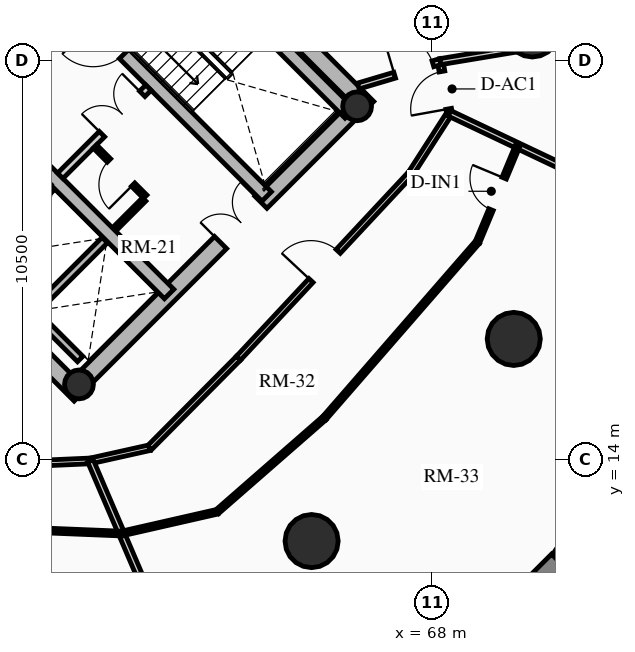
"""IFC4 building model, lengths in metres.
Left out: names, types, materials, properties, quantities, classifications, styles, units other than length and angle.
Written with IfcOpenShell. Run it as: python <this file> out.ifc"""

import sys

from ifc_helpers import new_model, si_unit, direction, frame, frame_2d, origin, origin_2d, place, context, subcontext, project, spatial, rectangle, circle, hollow_circle, extrude, source, transform, mapped, element, fill, save


model = new_model("IFC4")
c1 = context("Model", 3, precision=1e-05, world=origin(), true_north=direction((0.0, 1.0)))
c2 = subcontext(c1, "Body", "Model", "MODEL_VIEW")
j1 = project(units=[si_unit("LENGTHUNIT", "METRE"), si_unit("PLANEANGLEUNIT", "RADIAN")], contexts=[c1])
p1 = place(None, origin())
s1 = spatial("IfcSite", under=j1, at=p1, CompositionType="ELEMENT")
p2 = place(p1, origin())
s2 = spatial("IfcBuilding", under=s1, at=p2, CompositionType="ELEMENT")
p3 = place(p2, frame((0.0, 0.0, 110.89)))
s3 = spatial("IfcBuildingStorey", under=s2, at=p3, CompositionType="ELEMENT", Elevation=110.89)
for number, where, z_axis, x_axis in (
    (1, (58.737, 15.697, 0.0), (0.0, 0.0, 1.0), (-0.707, 0.707, 0.0)),
    (2, (66.303, 23.263, 0.0), (0.0, 0.0, 1.0), (-0.707, 0.707, 0.0)),
):
    element("IfcWall", number, at=place(p3, frame(where, z_axis=z_axis, x_axis=x_axis)), inside=s3, PredefinedType="SHEAR", context=c2, shape_type="SweptSolid", body=[
        extrude(rectangle(XDim=14.2, YDim=0.45, at=frame_2d((7.1, 0.0))), origin(), (0.0, 0.0, 1.0), 2.91),
    ])
p4 = place(p3, frame((58.578, 15.856, 0.0), z_axis=(0.0, 0.0, 1.0), x_axis=(0.707106781187, 0.707106781187, 0.0)))
e3 = element("IfcWall", 3, at=p4, inside=s3, PredefinedType="SHEAR", context=c2, shape_type="SweptSolid", body=[
    extrude(rectangle(XDim=10.7, YDim=0.45, at=frame_2d((5.35, 0.0))), origin(), (0.0, 0.0, 1.0), 2.91),
])
m1 = source(origin(), c2, "Body", "SweptSolid", [
    extrude(rectangle(XDim=1.5, YDim=2.02, at=frame_2d((0.75, 1.01))), frame((0.0, 0.235, 0.0), z_axis=(0.0, -1.0, 0.0), x_axis=(1.0, 0.0, 0.0)), (0.0, 0.0, 1.0), 0.47),
])
p5 = place(p4, frame((5.45, 0.0, 0.0)))
e4 = element("IfcOpeningElement", 4, at=p5, cuts=e3, PredefinedType="OPENING", context=c2, shape_type="MappedRepresentation", body=[
    mapped(m1, transform((0.0, 0.0, 0.0), x_axis=(1.0, 0.0, 0.0), y_axis=(0.0, 1.0, 0.0), z_axis=(0.0, 0.0, 1.0), scale=1.0)),
])
p6 = place(p3, frame((61.078, 18.355, 0.0), z_axis=(0.0, 0.0, 1.0), x_axis=(-0.707106781187, 0.707106781187, 0.0)))
e5 = element("IfcWall", 5, at=p6, inside=s3, PredefinedType="SHEAR", context=c2, shape_type="SweptSolid", body=[
    extrude(rectangle(XDim=13.75, YDim=0.35, at=frame_2d((6.875, 0.0))), origin(), (0.0, 0.0, 1.0), 2.91),
])
m2 = source(origin(), c2, "Body", "SweptSolid", [
    extrude(rectangle(XDim=1.1, YDim=2.015, at=frame_2d((0.55, 1.007))), frame((0.0, 0.185, 0.0), z_axis=(0.0, -1.0, 0.0), x_axis=(1.0, 0.0, 0.0)), (0.0, 0.0, 1.0), 0.37),
])
p7 = place(p6, frame((4.875, 0.0, 0.0)))
e6 = element("IfcOpeningElement", 6, at=p7, cuts=e5, PredefinedType="OPENING", context=c2, shape_type="MappedRepresentation", body=[
    mapped(m2, transform((0.0, 0.0, 0.0), x_axis=(1.0, 0.0, 0.0), y_axis=(0.0, 1.0, 0.0), z_axis=(0.0, 0.0, 1.0), scale=1.0)),
])
m3 = source(origin(), c2, "Body", "SweptSolid", [
    extrude(rectangle(XDim=1.15, YDim=2.02, at=frame_2d((0.575, 1.01))), frame((0.0, 0.185, 0.0), z_axis=(0.0, -1.0, 0.0), x_axis=(1.0, 0.0, 0.0)), (0.0, 0.0, 1.0), 0.37),
])
p8 = place(p6, frame((7.295, 0.0, 0.0)))
e7 = element("IfcOpeningElement", 7, at=p8, cuts=e5, PredefinedType="OPENING", context=c2, shape_type="MappedRepresentation", body=[
    mapped(m3, transform((0.0, 0.0, 0.0), x_axis=(1.0, 0.0, 0.0), y_axis=(0.0, 1.0, 0.0), z_axis=(0.0, 0.0, 1.0), scale=1.0)),
])
p9 = place(p3, frame((63.645, 20.922, 0.0), z_axis=(0.0, 0.0, 1.0), x_axis=(-0.707106781187, 0.707106781187, 0.0)))
e8 = element("IfcWall", 8, at=p9, inside=s3, PredefinedType="SHEAR", context=c2, shape_type="SweptSolid", body=[
    extrude(rectangle(XDim=13.75, YDim=0.35, at=frame_2d((6.875, 0.0))), origin(), (0.0, 0.0, 1.0), 2.91),
])
p10 = place(p9, frame((10.0, 0.0, 0.0)))
e9 = element("IfcOpeningElement", 9, at=p10, cuts=e8, PredefinedType="OPENING", context=c2, shape_type="MappedRepresentation", body=[
    mapped(m2, transform((0.0, 0.0, 0.0), x_axis=(1.0, 0.0, 0.0), y_axis=(0.0, 1.0, 0.0), z_axis=(0.0, 0.0, 1.0), scale=1.0)),
])
p11 = place(p9, frame((12.0, 0.0, 0.0)))
e10 = element("IfcOpeningElement", 10, at=p11, cuts=e8, PredefinedType="OPENING", context=c2, shape_type="MappedRepresentation", body=[
    mapped(m2, transform((0.0, 0.0, 0.0), x_axis=(1.0, 0.0, 0.0), y_axis=(0.0, 1.0, 0.0), z_axis=(0.0, 0.0, 1.0), scale=1.0)),
])
p12 = place(p9, frame((5.305, 0.0, 0.0)))
e11 = element("IfcOpeningElement", 11, at=p12, cuts=e8, PredefinedType="OPENING", context=c2, shape_type="MappedRepresentation", body=[
    mapped(m3, transform((0.0, 0.0, 0.0), x_axis=(1.0, 0.0, 0.0), y_axis=(0.0, 1.0, 0.0), z_axis=(0.0, 0.0, 1.0), scale=1.0)),
])
p13 = place(p3, frame((65.83, 23.107, 0.0), z_axis=(0.0, 0.0, 1.0), x_axis=(-0.707088616009, 0.707124945897, 0.0)))
e12 = element("IfcWall", 12, at=p13, inside=s3, PredefinedType="SHEAR", context=c2, shape_type="SweptSolid", body=[
    extrude(rectangle(XDim=6.72, YDim=0.35, at=frame_2d((3.36, 0.0))), origin(), (0.0, 0.0, 1.0), 2.91),
])
for number, where, z_axis, x_axis in (
    (13, (58.706, 15.976, 0.0), (0.0, 0.0, 1.0), (0.707, 0.707, 0.0)),
    (14, (66.024, 23.294, 0.0), (0.0, 0.0, 1.0), (0.707, 0.707, 0.0)),
):
    element("IfcColumn", number, at=place(p3, frame(where, z_axis=z_axis, x_axis=x_axis)), inside=s3, PredefinedType="COLUMN", context=c2, shape_type="SweptSolid", body=[
        extrude(hollow_circle(Radius=0.38, WallThickness=0.032, at=origin_2d()), origin(), (0.0, 0.0, 1.0), 2.91),
    ])
for number, where, z_axis, x_axis in (
    (15, (64.827, 11.854, 0.0), (0.0, 0.0, 1.0), (1.0, 0.0, 0.0)),
    (16, (70.146, 17.173, 0.0), (0.0, 0.0, 1.0), (1.0, 0.0, 0.0)),
    (17, (70.635, 25.291, 0.0), (0.0, 0.0, 1.0), (1.0, 0.0, 0.0)),
):
    element("IfcColumn", number, at=place(p3, frame(where, z_axis=z_axis, x_axis=x_axis)), inside=s3, PredefinedType="USERDEFINED", context=c2, shape_type="SweptSolid", body=[
        extrude(circle(Radius=0.7, at=origin_2d()), origin(), (0.0, 0.0, 1.0), 2.91),
    ])
p14 = place(p3, frame((70.985, 11.015, 0.0), z_axis=(0.0, 0.0, 1.0), x_axis=(-0.828781148131, -0.559572880421, 0.0)))
e18 = element("IfcWall", 18, at=p14, inside=s3, PredefinedType="SOLIDWALL", context=c2, shape_type="SweptSolid", body=[
    extrude(rectangle(XDim=4.905, YDim=0.24, at=frame_2d((2.452, 0.0))), origin(), (0.0, 0.0, 1.0), 2.179),
])
p15 = place(p3, frame((73.729, 15.08, 0.0), z_axis=(0.0, 0.0, 1.0), x_axis=(-0.559572880421, -0.828781148131, 0.0)))
e19 = element("IfcWall", 19, at=p15, inside=s3, PredefinedType="SOLIDWALL", context=c2, shape_type="SweptSolid", body=[
    extrude(rectangle(XDim=4.905, YDim=0.24, at=frame_2d((2.452, 0.0))), origin(), (0.0, 0.0, 1.0), 2.179),
])
m4 = source(origin(), c2, "Body", "SweptSolid", [
    extrude(rectangle(XDim=1.9, YDim=1.35, at=frame_2d((0.95, 0.675))), frame((0.0, 0.13, 0.0), z_axis=(0.0, -1.0, 0.0), x_axis=(1.0, 0.0, 0.0)), (0.0, 0.0, 1.0), 0.26),
])
p16 = place(p15, frame((1.502, 0.0, 0.65)))
e20 = element("IfcOpeningElement", 20, at=p16, cuts=e19, PredefinedType="OPENING", context=c2, shape_type="MappedRepresentation", body=[
    mapped(m4, transform((0.0, 0.0, 0.0), x_axis=(1.0, 0.0, 0.0), y_axis=(0.0, 1.0, 0.0), z_axis=(0.0, 0.0, 1.0), scale=1.0)),
])
p17 = place(p3, frame((55.888, 19.069, 0.0), z_axis=(0.0, 0.0, 1.0), x_axis=(0.707106781187, 0.707106781187, 0.0)))
e21 = element("IfcWall", 21, at=p17, inside=s3, PredefinedType="SHEAR", context=c2, shape_type="SweptSolid", body=[
    extrude(rectangle(XDim=2.97, YDim=0.2, at=frame_2d((1.485, 0.0))), origin(), (0.0, 0.0, 1.0), 2.91),
])
p18 = place(p3, frame((57.284, 17.673, 0.0), z_axis=(0.0, 0.0, 1.0), x_axis=(0.707147878904, 0.70706568108, 0.0)))
e22 = element("IfcWall", 22, at=p18, inside=s3, PredefinedType="SHEAR", context=c2, shape_type="SweptSolid", body=[
    extrude(rectangle(XDim=2.97, YDim=0.2, at=frame_2d((1.485, 0.0))), origin(), (0.0, 0.0, 1.0), 2.91),
])
p19 = place(p3, frame((58.737, 16.644, 0.0), z_axis=(0.0, 0.0, 1.0), x_axis=(-0.707032117043, 0.707181437447, 0.0)))
e23 = element("IfcWall", 23, at=p19, inside=s3, PredefinedType="SHEAR", context=c2, shape_type="SweptSolid", body=[
    extrude(rectangle(XDim=1.635, YDim=0.2, at=frame_2d((0.817, 0.0))), origin(), (0.0, 0.0, 1.0), 2.91),
])
p20 = place(p3, frame((58.214, 21.467, 0.0), z_axis=(0.0, 0.0, 1.0), x_axis=(0.707106781187, 0.707106781187, 0.0)))
e24 = element("IfcWall", 24, at=p20, inside=s3, PredefinedType="PARTITIONING", context=c2, shape_type="SweptSolid", body=[
    extrude(rectangle(XDim=3.28, YDim=0.2, at=frame_2d((1.64, 0.0))), origin(), (0.0, 0.0, 1.0), 2.655),
])
m5 = source(origin(), c2, "Body", "SweptSolid", [
    extrude(rectangle(XDim=1.5, YDim=2.02, at=frame_2d((0.75, 1.01))), frame((0.0, 0.11, 0.0), z_axis=(0.0, -1.0, 0.0), x_axis=(1.0, 0.0, 0.0)), (0.0, 0.0, 1.0), 0.22),
])
p21 = place(p20, frame((1.55, 0.0, 0.0)))
e25 = element("IfcOpeningElement", 25, at=p21, cuts=e24, PredefinedType="OPENING", context=c2, shape_type="MappedRepresentation", body=[
    mapped(m5, transform((0.0, 0.0, 0.0), x_axis=(1.0, 0.0, 0.0), y_axis=(0.0, 1.0, 0.0), z_axis=(0.0, 0.0, 1.0), scale=1.0)),
])
p22 = place(p3, frame((60.448, 20.915, 0.0), z_axis=(0.0, 0.0, 1.0), x_axis=(-0.707106781187, 0.707106781187, 0.0)))
e26 = element("IfcWall", 26, at=p22, inside=s3, PredefinedType="PARTITIONING", context=c2, shape_type="SweptSolid", body=[
    extrude(rectangle(XDim=1.87, YDim=0.125, at=frame_2d((0.935, 0.0))), origin(), (0.0, 0.0, 1.0), 2.655),
])
m6 = source(origin(), c2, "Body", "SweptSolid", [
    extrude(rectangle(XDim=0.9, YDim=2.005, at=frame_2d((0.45, 1.002))), frame((0.0, 0.073, 0.0), z_axis=(0.0, -1.0, 0.0), x_axis=(1.0, 0.0, 0.0)), (0.0, 0.0, 1.0), 0.145),
])
p23 = place(p22, frame((0.45, 0.0, 0.0)))
e27 = element("IfcOpeningElement", 27, at=p23, cuts=e26, PredefinedType="OPENING", context=c2, shape_type="MappedRepresentation", body=[
    mapped(m6, transform((0.0, 0.0, 0.0), x_axis=(1.0, 0.0, 0.0), y_axis=(0.0, 1.0, 0.0), z_axis=(0.0, 0.0, 1.0), scale=1.0)),
])
p24 = place(p3, frame((59.643, 20.066, 0.0), z_axis=(0.0, 0.0, 1.0), x_axis=(0.707106781187, 0.707106781187, 0.0)))
e28 = element("IfcWall", 28, at=p24, inside=s3, PredefinedType="PARTITIONING", context=c2, shape_type="SweptSolid", body=[
    extrude(rectangle(XDim=1.1, YDim=0.125, at=frame_2d((0.55, 0.0))), origin(), (0.0, 0.0, 1.0), 2.655),
])
p25 = place(p3, frame((57.511, 13.897, 0.0), z_axis=(0.0, 0.0, 1.0), x_axis=(0.999024538494, 0.044158481476, 0.0)))
e29 = element("IfcWall", 29, at=p25, inside=s3, PredefinedType="PARTITIONING", context=c2, shape_type="SweptSolid", body=[
    extrude(rectangle(XDim=1.498, YDim=0.15, at=frame_2d((0.749, 0.0))), origin(), (0.0, 0.0, 1.0), 2.225),
])
p26 = place(p3, frame((59.008, 13.963, 0.0), z_axis=(0.0, 0.0, 1.0), x_axis=(0.976020856791, 0.21767702476, 0.0)))
e30 = element("IfcWall", 30, at=p26, inside=s3, PredefinedType="PARTITIONING", context=c2, shape_type="SweptSolid", body=[
    extrude(rectangle(XDim=1.593, YDim=0.15, at=frame_2d((0.796, 0.0))), origin(), (0.0, 0.0, 1.0), 2.225),
])
p27 = place(p3, frame((60.562, 14.31, 0.0), z_axis=(0.0, 0.0, 1.0), x_axis=(0.704566236161, 0.709638230975, 0.0)))
e31 = element("IfcWall", 31, at=p27, inside=s3, PredefinedType="PARTITIONING", context=c2, shape_type="SweptSolid", body=[
    extrude(rectangle(XDim=3.321, YDim=0.15, at=frame_2d((1.661, 0.0))), origin(), (0.0, 0.0, 1.0), 2.225),
])
p28 = place(p3, frame((62.903, 16.667, 0.0), z_axis=(0.0, 0.0, 1.0), x_axis=(0.682371947497, 0.731005147225, 0.0)))
e32 = element("IfcWall", 32, at=p28, inside=s3, PredefinedType="PARTITIONING", context=c2, shape_type="SweptSolid", body=[
    extrude(rectangle(XDim=6.642, YDim=0.15, at=frame_2d((3.321, 0.0))), origin(), (0.0, 0.0, 1.0), 2.225),
])
m7 = source(origin(), c2, "Body", "SweptSolid", [
    extrude(rectangle(XDim=1.05, YDim=2.015, at=frame_2d((0.525, 1.007))), frame((0.0, 0.085, 0.0), z_axis=(0.0, -1.0, 0.0), x_axis=(1.0, 0.0, 0.0)), (0.0, 0.0, 1.0), 0.17),
])
p29 = place(p28, frame((2.796, 0.0, 0.0)))
e33 = element("IfcOpeningElement", 33, at=p29, cuts=e32, PredefinedType="OPENING", context=c2, shape_type="MappedRepresentation", body=[
    mapped(m7, transform((0.0, 0.0, 0.0), x_axis=(1.0, 0.0, 0.0), y_axis=(0.0, 1.0, 0.0), z_axis=(0.0, 0.0, 1.0), scale=1.0)),
])
p30 = place(p3, frame((67.435, 21.521, 0.0), z_axis=(0.0, 0.0, 1.0), x_axis=(0.540777197838, 0.841165870859, 0.0)))
e34 = element("IfcWall", 34, at=p30, inside=s3, PredefinedType="PARTITIONING", context=c2, shape_type="SweptSolid", body=[
    extrude(rectangle(XDim=1.888, YDim=0.15, at=frame_2d((0.944, 0.0))), origin(), (0.0, 0.0, 1.0), 2.225),
])
p31 = place(p3, frame((68.456, 23.11, 0.0), z_axis=(0.0, 0.0, 1.0), x_axis=(-0.1772522795, 0.984165448191, 0.0)))
e35 = element("IfcWall", 35, at=p31, inside=s3, PredefinedType="PARTITIONING", context=c2, shape_type="SweptSolid", body=[
    extrude(rectangle(XDim=1.382, YDim=0.15, at=frame_2d((0.691, 0.0))), origin(), (0.0, 0.0, 1.0), 2.225),
])
m8 = source(origin(), c2, "Body", "SweptSolid", [
    extrude(rectangle(XDim=1.0, YDim=2.015, at=frame_2d((0.5, 1.007))), frame((0.0, 0.085, 0.0), z_axis=(0.0, -1.0, 0.0), x_axis=(1.0, 0.0, 0.0)), (0.0, 0.0, 1.0), 0.17),
])
p32 = place(p31, frame((0.12, 0.0, 0.0)))
e36 = element("IfcOpeningElement", 36, at=p32, cuts=e35, PredefinedType="OPENING", context=c2, shape_type="MappedRepresentation", body=[
    mapped(m8, transform((0.0, 0.0, 0.0), x_axis=(1.0, 0.0, 0.0), y_axis=(0.0, 1.0, 0.0), z_axis=(0.0, 0.0, 1.0), scale=1.0)),
])
p33 = place(p3, frame((59.008, 13.963, 0.0), z_axis=(0.0, 0.0, 1.0), x_axis=(0.393439207333, -0.919350635032, 0.0)))
e37 = element("IfcWall", 37, at=p33, inside=s3, PredefinedType="PARTITIONING", context=c2, shape_type="SweptSolid", body=[
    extrude(rectangle(XDim=7.427, YDim=0.16, at=frame_2d((3.713, 0.0))), origin(), (0.0, 0.0, 1.0), 2.179),
])
p34 = place(p3, frame((68.456, 23.11, 0.0), z_axis=(0.0, 0.0, 1.0), x_axis=(0.903539425667, -0.428504966442, 0.0)))
e38 = element("IfcWall", 38, at=p34, inside=s3, PredefinedType="PARTITIONING", context=c2, shape_type="SweptSolid", body=[
    extrude(rectangle(XDim=7.094, YDim=0.16, at=frame_2d((3.547, 0.0))), origin(), (0.0, 0.0, 1.0), 2.179),
])
p35 = place(p3, frame((68.211, 24.469, 0.0), z_axis=(0.0, 0.0, 1.0), x_axis=(0.986479033329, 0.163887512651, 0.0)))
e39 = element("IfcWall", 39, at=p35, inside=s3, PredefinedType="PARTITIONING", context=c2, shape_type="SweptSolid", body=[
    extrude(rectangle(XDim=6.193, YDim=0.16, at=frame_2d((3.096, 0.0))), origin(), (0.0, 0.0, 1.0), 2.179),
])
p36 = place(p3, frame((66.056, 23.828, 0.0), z_axis=(0.0, 0.0, 1.0), x_axis=(0.958475403544, 0.285175210708, 0.0)))
e40 = element("IfcWall", 40, at=p36, inside=s3, PredefinedType="PARTITIONING", context=c2, shape_type="SweptSolid", body=[
    extrude(rectangle(XDim=2.248, YDim=0.16, at=frame_2d((1.124, 0.0))), origin(), (0.0, 0.0, 1.0), 2.225),
])
m9 = source(origin(), c2, "Body", "SweptSolid", [
    extrude(rectangle(XDim=1.05, YDim=2.015, at=frame_2d((0.525, 1.007))), frame((0.0, 0.09, 0.0), z_axis=(0.0, -1.0, 0.0), x_axis=(1.0, 0.0, 0.0)), (0.0, 0.0, 1.0), 0.18),
])
p37 = place(p36, frame((0.998, 0.0, 0.0)))
e41 = element("IfcOpeningElement", 41, at=p37, cuts=e40, PredefinedType="OPENING", context=c2, shape_type="MappedRepresentation", body=[
    mapped(m9, transform((0.0, 0.0, 0.0), x_axis=(1.0, 0.0, 0.0), y_axis=(0.0, 1.0, 0.0), z_axis=(0.0, 0.0, 1.0), scale=1.0)),
])
p38 = place(p3, frame((57.233, 12.156, 0.0), z_axis=(0.0, 0.0, 1.0), x_axis=(0.999181916557, -0.040441286156, 0.0)))
e42 = element("IfcWall", 42, at=p38, inside=s3, PredefinedType="PARTITIONING", context=c2, shape_type="SweptSolid", body=[
    extrude(rectangle(XDim=2.596, YDim=0.125, at=frame_2d((1.298, 0.0))), origin(), (0.0, 0.0, 1.0), 2.655),
])
p39 = place(p3, frame((59.826, 12.051, 0.0), z_axis=(0.0, 0.0, 1.0), x_axis=(0.975009915085, 0.222161350116, 0.0)))
e43 = element("IfcWall", 43, at=p39, inside=s3, PredefinedType="PARTITIONING", context=c2, shape_type="SweptSolid", body=[
    extrude(rectangle(XDim=2.578, YDim=0.125, at=frame_2d((1.289, 0.0))), origin(), (0.0, 0.0, 1.0), 2.225),
])
p40 = place(p3, frame((62.34, 12.624, 0.0), z_axis=(0.0, 0.0, 1.0), x_axis=(0.753169839919, 0.657826110941, 0.0)))
e44 = element("IfcWall", 44, at=p40, inside=s3, PredefinedType="PARTITIONING", context=c2, shape_type="SweptSolid", body=[
    extrude(rectangle(XDim=3.746, YDim=0.125, at=frame_2d((1.873, 0.0))), origin(), (0.0, 0.0, 1.0), 2.225),
])
p41 = place(p3, frame((65.162, 15.088, 0.0), z_axis=(0.0, 0.0, 1.0), x_axis=(0.656379509785, 0.754430871011, 0.0)))
e45 = element("IfcWall", 45, at=p41, inside=s3, PredefinedType="PARTITIONING", context=c2, shape_type="SweptSolid", body=[
    extrude(rectangle(XDim=6.14, YDim=0.125, at=frame_2d((3.07, 0.0))), origin(), (0.0, 0.0, 1.0), 2.225),
])
p42 = place(p3, frame((69.192, 19.72, 0.0), z_axis=(0.0, 0.0, 1.0), x_axis=(0.384899070029, 0.922958669655, 0.0)))
e46 = element("IfcWall", 46, at=p42, inside=s3, PredefinedType="PARTITIONING", context=c2, shape_type="SweptSolid", body=[
    extrude(rectangle(XDim=2.75, YDim=0.125, at=frame_2d((1.375, 0.0))), origin(), (0.0, 0.0, 1.0), 2.179),
])
p43 = place(p42, frame((0.925, 0.0, 0.0)))
e47 = element("IfcOpeningElement", 47, at=p43, cuts=e46, PredefinedType="OPENING", context=c2, shape_type="MappedRepresentation", body=[
    mapped(m6, transform((0.0, 0.0, 0.0), x_axis=(1.0, 0.0, 0.0), y_axis=(0.0, 1.0, 0.0), z_axis=(0.0, 0.0, 1.0), scale=1.0)),
])
m10 = source(origin(), c2, "Body", "SweptSolid", [
    extrude(rectangle(XDim=1.15, YDim=2.02, at=frame_2d((0.575, 1.01))), frame((0.0, 0.025, 0.0), z_axis=(0.0, -1.0, 0.0), x_axis=(1.0, 0.0, 0.0)), (0.0, 0.0, 1.0), 0.05),
])
p44 = place(p12, origin())
e48 = element("IfcDoor", 48, at=p44, inside=s3, OperationType="SINGLE_SWING_RIGHT", PredefinedType="DOOR", context=c2, shape_type="MappedRepresentation", body=[
    mapped(m10, transform((0.0, 0.0, 0.0), x_axis=(1.0, 0.0, 0.0), y_axis=(0.0, 1.0, 0.0), z_axis=(0.0, 0.0, 1.0), scale=1.0)),
])
fill(e11, e48)
m11 = source(origin(), c2, "Body", "SweptSolid", [
    extrude(rectangle(XDim=1.5, YDim=2.02, at=frame_2d((0.75, 1.01))), frame((0.0, 0.025, 0.0), z_axis=(0.0, -1.0, 0.0), x_axis=(1.0, 0.0, 0.0)), (0.0, 0.0, 1.0), 0.05),
])
p45 = place(p5, origin())
e49 = element("IfcDoor", 49, at=p45, inside=s3, OperationType="DOUBLE_DOOR_SINGLE_SWING", PredefinedType="DOOR", context=c2, shape_type="MappedRepresentation", body=[
    mapped(m11, transform((0.0, 0.0, 0.0), x_axis=(1.0, 0.0, 0.0), y_axis=(0.0, 1.0, 0.0), z_axis=(0.0, 0.0, 1.0), scale=1.0)),
])
fill(e4, e49)
p46 = place(p21, origin())
e50 = element("IfcDoor", 50, at=p46, inside=s3, OperationType="DOUBLE_DOOR_SINGLE_SWING", PredefinedType="DOOR", context=c2, shape_type="MappedRepresentation", body=[
    mapped(m11, transform((0.0, 0.0, 0.0), x_axis=(1.0, 0.0, 0.0), y_axis=(0.0, 1.0, 0.0), z_axis=(0.0, 0.0, 1.0), scale=1.0)),
])
fill(e25, e50)
m12 = source(origin(), c2, "Body", "SweptSolid", [
    extrude(rectangle(XDim=0.9, YDim=2.005, at=frame_2d((0.45, 1.002))), frame((0.0, 0.025, 0.0), z_axis=(0.0, -1.0, 0.0), x_axis=(1.0, 0.0, 0.0)), (0.0, 0.0, 1.0), 0.05),
])
p47 = place(p23, origin())
e51 = element("IfcDoor", 51, at=p47, inside=s3, OperationType="SINGLE_SWING_LEFT", PredefinedType="DOOR", context=c2, shape_type="MappedRepresentation", body=[
    mapped(m12, transform((0.0, 0.0, 0.0), x_axis=(1.0, 0.0, 0.0), y_axis=(0.0, 1.0, 0.0), z_axis=(0.0, 0.0, 1.0), scale=1.0)),
])
fill(e27, e51)
m13 = source(origin(), c2, "Body", "SweptSolid", [
    extrude(rectangle(XDim=1.05, YDim=2.015, at=frame_2d((0.525, 1.007))), frame((0.0, 0.025, 0.0), z_axis=(0.0, -1.0, 0.0), x_axis=(1.0, 0.0, 0.0)), (0.0, 0.0, 1.0), 0.05),
])
p48 = place(p37, origin())
e52 = element("IfcDoor", 52, at=p48, inside=s3, OperationType="SINGLE_SWING_LEFT", PredefinedType="DOOR", context=c2, shape_type="MappedRepresentation", body=[
    mapped(m13, transform((0.0, 0.0, 0.0), x_axis=(1.0, 0.0, 0.0), y_axis=(0.0, 1.0, 0.0), z_axis=(0.0, 0.0, 1.0), scale=1.0)),
])
fill(e41, e52)
p49 = place(p29, origin())
e53 = element("IfcDoor", 53, at=p49, inside=s3, OperationType="SINGLE_SWING_LEFT", PredefinedType="DOOR", context=c2, shape_type="MappedRepresentation", body=[
    mapped(m13, transform((0.0, 0.0, 0.0), x_axis=(1.0, 0.0, 0.0), y_axis=(0.0, 1.0, 0.0), z_axis=(0.0, 0.0, 1.0), scale=1.0)),
])
fill(e33, e53)
p50 = place(p43, origin())
e54 = element("IfcDoor", 54, at=p50, inside=s3, OperationType="SINGLE_SWING_RIGHT", PredefinedType="DOOR", context=c2, shape_type="MappedRepresentation", body=[
    mapped(m12, transform((0.0, 0.0, 0.0), x_axis=(1.0, 0.0, 0.0), y_axis=(0.0, 1.0, 0.0), z_axis=(0.0, 0.0, 1.0), scale=1.0)),
])
fill(e47, e54)
m14 = source(origin(), c2, "Body", "SweptSolid", [
    extrude(rectangle(XDim=1.0, YDim=2.015, at=frame_2d((0.5, 1.007))), frame((0.0, 0.025, 0.0), z_axis=(0.0, -1.0, 0.0), x_axis=(1.0, 0.0, 0.0)), (0.0, 0.0, 1.0), 0.05),
])
p51 = place(p32, origin())
e55 = element("IfcDoor", 55, at=p51, inside=s3, OperationType="SINGLE_SWING_LEFT", PredefinedType="DOOR", context=c2, shape_type="MappedRepresentation", body=[
    mapped(m14, transform((0.0, 0.0, 0.0), x_axis=(1.0, 0.0, 0.0), y_axis=(0.0, 1.0, 0.0), z_axis=(0.0, 0.0, 1.0), scale=1.0)),
])
fill(e36, e55)
save(model, sys.argv[1])
